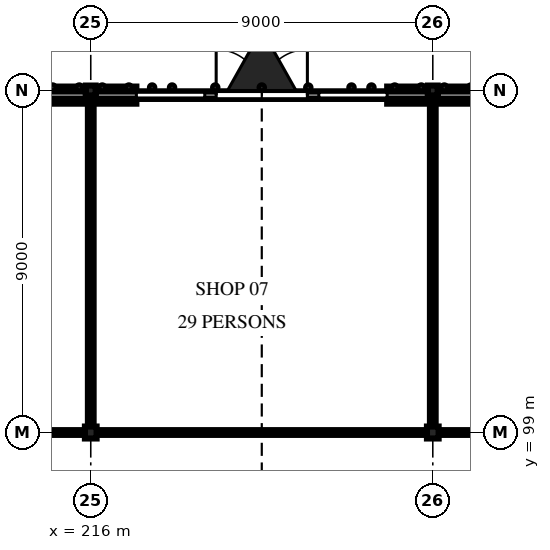
"""IFC4 building model, lengths in metres.
Left out: names, types, materials, properties, quantities, classifications, styles, units other than length and angle.
Written with IfcOpenShell. Run it as: python <this file> out.ifc"""

import sys

from ifc_helpers import new_model, si_unit, direction, frame, frame_2d, origin, origin_2d, place, context, subcontext, project, spatial, polyline, rectangle, i_section, outline, extrude, element, fill, save


model = new_model("IFC4")
c1 = context("Model", 3, precision=1e-05, world=origin(), true_north=direction((0.0, 1.0)))
c2 = subcontext(c1, "Body", "Model", "MODEL_VIEW")
j1 = project(units=[si_unit("LENGTHUNIT", "METRE"), si_unit("PLANEANGLEUNIT", "RADIAN")], contexts=[c1])
p1 = place(None, origin())
s1 = spatial("IfcSite", under=j1, at=p1, CompositionType="ELEMENT")
p2 = place(p1, origin())
s2 = spatial("IfcBuilding", under=s1, at=p2, CompositionType="ELEMENT")
p3 = place(p2, origin())
s3 = spatial("IfcBuildingStorey", under=s2, at=p3, CompositionType="ELEMENT", Elevation=0.0)
p4 = place(p3, frame((216.0, 99.0, -2.1), z_axis=(0.0, 0.0, 1.0), x_axis=(1.0, 0.0, 0.0)))
e1 = element("IfcColumn", 1, at=p4, inside=s3, PredefinedType="COLUMN", context=c2, shape_type="SweptSolid", body=[
    extrude(i_section(OverallWidth=0.307, OverallDepth=0.314, WebThickness=0.012, FlangeThickness=0.019, FilletRadius=0.015, at=origin_2d()), origin(), (0.0, 0.0, 1.0), 9.6),
])
p5 = place(p3, frame((216.0, 108.0, -2.1), z_axis=(0.0, 0.0, 1.0), x_axis=(1.0, 0.0, 0.0)))
e2 = element("IfcColumn", 2, at=p5, inside=s3, PredefinedType="COLUMN", context=c2, shape_type="SweptSolid", body=[
    extrude(i_section(OverallWidth=0.256, OverallDepth=0.26, WebThickness=0.01, FlangeThickness=0.017, FilletRadius=0.013, at=origin_2d()), origin(), (0.0, 0.0, 1.0), 9.6),
])
p6 = place(p3, frame((225.0, 99.0, -2.1), z_axis=(0.0, 0.0, 1.0), x_axis=(1.0, 0.0, 0.0)))
e3 = element("IfcColumn", 3, at=p6, inside=s3, PredefinedType="COLUMN", context=c2, shape_type="SweptSolid", body=[
    extrude(i_section(OverallWidth=0.307, OverallDepth=0.314, WebThickness=0.012, FlangeThickness=0.019, FilletRadius=0.015, at=origin_2d()), origin(), (0.0, 0.0, 1.0), 9.6),
])
p7 = place(p3, frame((225.0, 108.0, -2.1), z_axis=(0.0, 0.0, 1.0), x_axis=(1.0, 0.0, 0.0)))
e4 = element("IfcColumn", 4, at=p7, inside=s3, PredefinedType="COLUMN", context=c2, shape_type="SweptSolid", body=[
    extrude(i_section(OverallWidth=0.256, OverallDepth=0.26, WebThickness=0.01, FlangeThickness=0.017, FilletRadius=0.013, at=origin_2d()), origin(), (0.0, 0.0, 1.0), 9.6),
])
p8 = place(p3, frame((214.8, 107.878, 0.0), z_axis=(0.0, 0.0, 1.0), x_axis=(1.0, 0.0, 0.0)))
e5 = element("IfcWall", 5, at=p8, inside=s3, PredefinedType="SOLIDWALL", context=c2, shape_type="SweptSolid", body=[
    extrude(rectangle(XDim=1.072, YDim=0.45, at=frame_2d((0.536, 0.0))), origin(), (0.0, 0.0, 1.0), 4.5),
])
p9 = place(p3, frame((207.128, 107.878, 4.9), z_axis=(0.0, 0.0, 1.0), x_axis=(1.0, 0.0, 0.0)))
e6 = element("IfcWall", 6, at=p9, inside=s3, PredefinedType="SOLIDWALL", context=c2, shape_type="SweptSolid", body=[
    extrude(rectangle(XDim=8.744, YDim=0.2, at=frame_2d((4.372, 0.0))), origin(), (0.0, 0.0, 1.0), 1.792),
])
p10 = place(p3, frame((216.128, 107.878, 0.0), z_axis=(0.0, 0.0, 1.0), x_axis=(1.0, 0.0, 0.0)))
e7 = element("IfcWall", 7, at=p10, inside=s3, PredefinedType="SOLIDWALL", context=c2, shape_type="SweptSolid", body=[
    extrude(rectangle(XDim=1.072, YDim=0.45, at=frame_2d((0.536, 0.0))), origin(), (0.0, 0.0, 1.0), 4.5),
])
p11 = place(p3, frame((219.0, 107.878, 0.0), z_axis=(0.0, 0.0, 1.0), x_axis=(1.0, 0.0, 0.0)))
e8 = element("IfcWall", 8, at=p11, inside=s3, PredefinedType="ELEMENTEDWALL", context=c2, shape_type="SweptSolid", body=[
    extrude(rectangle(XDim=3.0, YDim=0.15, at=frame_2d((1.5, 0.0))), origin(), (0.0, 0.0, 1.0), 4.5),
])
p12 = place(p11, frame((0.3, 0.0, 0.0)))
e9 = element("IfcOpeningElement", 9, at=p12, cuts=e8, PredefinedType="OPENING", context=c2, shape_type="SweptSolid", body=[
    extrude(rectangle(XDim=2.4, YDim=2.7, at=frame_2d((1.2, 1.35))), frame((0.0, 0.085, 0.0), z_axis=(0.0, -1.0, 0.0), x_axis=(1.0, 0.0, 0.0)), (0.0, 0.0, 1.0), 0.17),
])
p13 = place(p3, frame((223.8, 107.878, 0.0), z_axis=(0.0, 0.0, 1.0), x_axis=(1.0, 0.0, 0.0)))
e10 = element("IfcWall", 10, at=p13, inside=s3, PredefinedType="SOLIDWALL", context=c2, shape_type="SweptSolid", body=[
    extrude(rectangle(XDim=1.072, YDim=0.45, at=frame_2d((0.536, 0.0))), origin(), (0.0, 0.0, 1.0), 4.5),
])
p14 = place(p3, frame((216.128, 107.878, 4.9), z_axis=(0.0, 0.0, 1.0), x_axis=(1.0, 0.0, 0.0)))
e11 = element("IfcWall", 11, at=p14, inside=s3, PredefinedType="SOLIDWALL", context=c2, shape_type="SweptSolid", body=[
    extrude(rectangle(XDim=8.744, YDim=0.2, at=frame_2d((4.372, 0.0))), origin(), (0.0, 0.0, 1.0), 1.792),
])
p15 = place(p3, frame((225.128, 107.878, 0.0), z_axis=(0.0, 0.0, 1.0), x_axis=(1.0, 0.0, 0.0)))
e12 = element("IfcWall", 12, at=p15, inside=s3, PredefinedType="SOLIDWALL", context=c2, shape_type="SweptSolid", body=[
    extrude(rectangle(XDim=1.072, YDim=0.45, at=frame_2d((0.536, 0.0))), origin(), (0.0, 0.0, 1.0), 4.5),
])
p16 = place(p3, frame((225.128, 107.878, 4.9), z_axis=(0.0, 0.0, 1.0), x_axis=(1.0, 0.0, 0.0)))
e13 = element("IfcWall", 13, at=p16, inside=s3, PredefinedType="SOLIDWALL", context=c2, shape_type="SweptSolid", body=[
    extrude(rectangle(XDim=8.744, YDim=0.2, at=frame_2d((4.372, 0.0))), origin(), (0.0, 0.0, 1.0), 1.792),
])
for number, where, z_axis, x_axis in (
    (14, (207.154, 99.0, 0.0), (0.0, 0.0, 1.0), (1.0, 0.0, 0.0)),
    (15, (225.154, 99.0, 0.0), (0.0, 0.0, 1.0), (1.0, 0.0, 0.0)),
    (16, (216.154, 99.0, 0.0), (0.0, 0.0, 1.0), (1.0, 0.0, 0.0)),
):
    element("IfcWall", number, at=place(p3, frame(where, z_axis=z_axis, x_axis=x_axis)), inside=s3, PredefinedType="PARTITIONING", context=c2, shape_type="SweptSolid", body=[
        extrude(rectangle(XDim=8.692, YDim=0.125, at=frame_2d((4.346, 0.0))), origin(), (0.0, 0.0, 1.0), 6.757),
    ])
for number, where, z_axis, x_axis in (
    (17, (216.0, 107.87, 0.0), (0.0, 0.0, 1.0), (0.0, -1.0, 0.0)),
    (18, (225.0, 107.87, 0.0), (0.0, 0.0, 1.0), (0.0, -1.0, 0.0)),
):
    element("IfcWall", number, at=place(p3, frame(where, z_axis=z_axis, x_axis=x_axis)), inside=s3, PredefinedType="PARTITIONING", context=c2, shape_type="SweptSolid", body=[
        extrude(rectangle(XDim=8.713, YDim=0.15, at=frame_2d((4.356, 0.0))), origin(), (0.0, 0.0, 1.0), 6.6),
    ])
p17 = place(p12, origin())
e19 = element("IfcDoor", 19, at=p17, inside=s3, OperationType="DOUBLE_DOOR_SINGLE_SWING", PredefinedType="DOOR", context=c2, shape_type="SweptSolid", body=[
    extrude(outline(polyline([(0.0, 0.0), (0.07, 0.0), (0.07, 2.63), (2.33, 2.63), (2.33, 0.0), (2.4, 0.0), (2.4, 2.7), (0.0, 2.7), (0.0, 0.0)])), frame((0.0, 0.025, 0.0), z_axis=(0.0, -1.0, 0.0), x_axis=(1.0, 0.0, 0.0)), (0.0, 0.0, 1.0), 0.05),
    extrude(outline(polyline([(0.074, 0.01), (1.197, 0.01), (1.197, 2.626), (0.074, 2.626), (0.074, 0.01)]), holes=[polyline([(0.164, 0.31), (1.107, 0.31), (1.107, 2.536), (0.164, 2.536), (0.164, 0.31)])]), frame((0.0, 0.017, 0.0), z_axis=(0.0, -1.0, 0.0), x_axis=(1.0, 0.0, 0.0)), (0.0, 0.0, 1.0), 0.035),
    extrude(rectangle(XDim=0.943, YDim=2.226, at=frame_2d((0.635, 1.423))), frame((0.0, 0.006, 0.0), z_axis=(0.0, -1.0, 0.0), x_axis=(1.0, 0.0, 0.0)), (0.0, 0.0, 1.0), 0.012),
    extrude(outline(polyline([(1.203, 0.01), (2.326, 0.01), (2.326, 2.626), (1.203, 2.626), (1.203, 0.01)]), holes=[polyline([(1.293, 0.31), (2.236, 0.31), (2.236, 2.536), (1.293, 2.536), (1.293, 0.31)])]), frame((0.0, 0.017, 0.0), z_axis=(0.0, -1.0, 0.0), x_axis=(1.0, 0.0, 0.0)), (0.0, 0.0, 1.0), 0.035),
    extrude(rectangle(XDim=0.943, YDim=2.226, at=frame_2d((1.764, 1.423))), frame((0.0, 0.006, 0.0), z_axis=(0.0, -1.0, 0.0), x_axis=(1.0, 0.0, 0.0)), (0.0, 0.0, 1.0), 0.012),
])
fill(e9, e19)
save(model, sys.argv[1])
